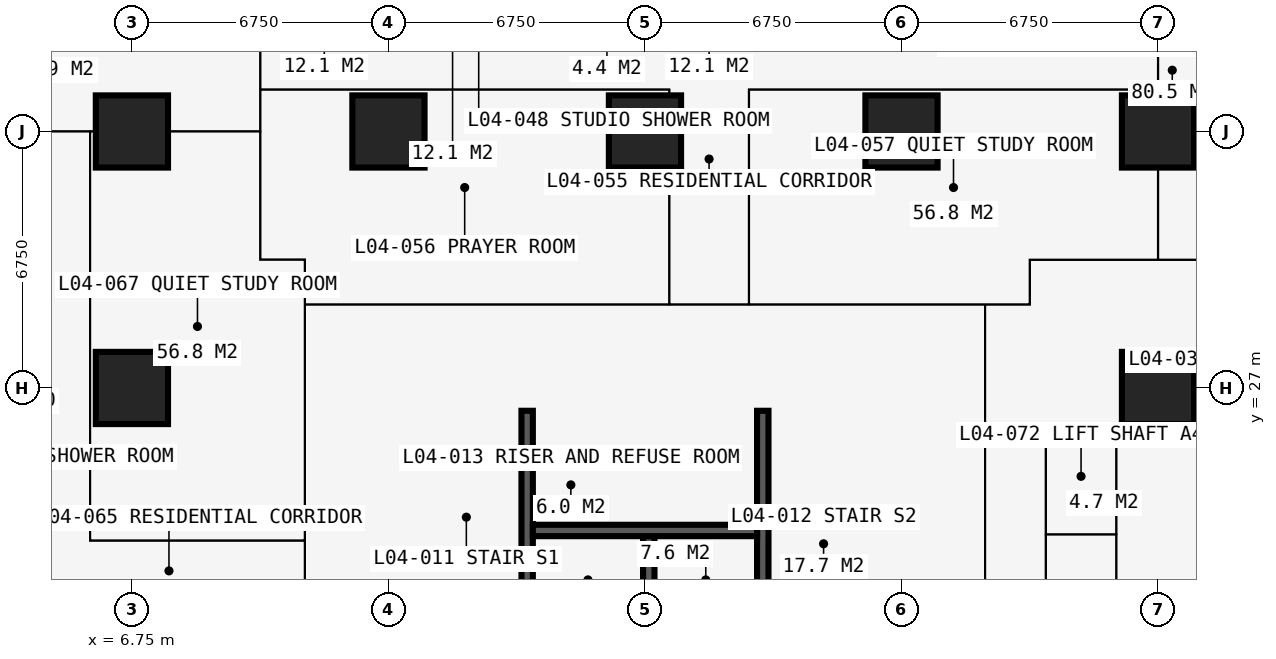
"""IFC4 building model, lengths in metres.
Left out: names, types, materials, properties, quantities, classifications, styles, units other than length and angle.
Written with IfcOpenShell. Run it as: python <this file> out.ifc"""

import sys

from ifc_helpers import new_model, si_unit, direction, frame, frame_2d, origin, origin_2d, place, context, subcontext, project, spatial, rectangle, extrude, element, fill, save


model = new_model("IFC4")
c1 = context("Model", 3, precision=1e-05, world=origin(), true_north=direction((0.0, 1.0)))
c2 = subcontext(c1, "Body", "Model", "MODEL_VIEW")
j1 = project(units=[si_unit("LENGTHUNIT", "METRE"), si_unit("PLANEANGLEUNIT", "RADIAN")], contexts=[c1])
p1 = place(None, origin())
s1 = spatial("IfcSite", under=j1, at=p1, CompositionType="ELEMENT")
p2 = place(p1, origin())
s2 = spatial("IfcBuilding", under=s1, at=p2, CompositionType="ELEMENT")
p3 = place(p2, frame((0.0, 0.0, 18.0)))
s3 = spatial("IfcBuildingStorey", under=s2, at=p3, CompositionType="ELEMENT", Elevation=18.0)
for number, where, z_axis, x_axis in (
    (1, (6.75, 27.0, 0.0), (0.0, 0.0, 1.0), (1.0, 0.0, 0.0)),
    (2, (6.75, 33.75, 0.0), (0.0, 0.0, 1.0), (1.0, 0.0, 0.0)),
    (3, (13.5, 33.75, 0.0), (0.0, 0.0, 1.0), (1.0, 0.0, 0.0)),
    (4, (20.25, 33.75, 0.0), (0.0, 0.0, 1.0), (1.0, 0.0, 0.0)),
    (5, (27.0, 33.75, 0.0), (0.0, 0.0, 1.0), (1.0, 0.0, 0.0)),
    (6, (33.75, 27.0, 0.0), (0.0, 0.0, 1.0), (1.0, 0.0, 0.0)),
    (7, (33.75, 33.75, 0.0), (0.0, 0.0, 1.0), (1.0, 0.0, 0.0)),
):
    element("IfcColumn", number, at=place(p3, frame(where, z_axis=z_axis, x_axis=x_axis)), inside=s3, PredefinedType="COLUMN", context=c2, shape_type="SweptSolid", body=[
        extrude(rectangle(XDim=1.9, YDim=1.9, at=origin_2d()), origin(), (0.0, 0.0, 1.0), 3.6),
    ])
p4 = place(p3, frame((27.0, 14.1, 0.0), z_axis=(0.0, 0.0, 1.0), x_axis=(0.0, 1.0, 0.0)))
e8 = element("IfcWall", 8, at=p4, inside=s3, PredefinedType="SHEAR", context=c2, shape_type="SweptSolid", body=[
    extrude(rectangle(XDim=12.3, YDim=1.2, at=frame_2d((6.15, 0.0))), origin(), (0.0, 0.0, 1.0), 3.6),
])
p5 = place(p4, frame((3.65, 0.0, 0.0)))
e9 = element("IfcOpeningElement", 9, at=p5, cuts=e8, PredefinedType="OPENING", context=c2, shape_type="SweptSolid", body=[
    extrude(rectangle(XDim=1.2, YDim=2.2, at=frame_2d((0.6, 1.1))), frame((0.0, 0.61, 0.0), z_axis=(0.0, -1.0, 0.0), x_axis=(1.0, 0.0, 0.0)), (0.0, 0.0, 1.0), 1.22),
])
p6 = place(p3, frame((27.6, 27.0, 0.0), z_axis=(0.0, 0.0, 1.0), x_axis=(-1.0, 0.0, 0.0)))
e10 = element("IfcWall", 10, at=p6, inside=s3, PredefinedType="SHEAR", context=c2, shape_type="SweptSolid", body=[
    extrude(rectangle(XDim=14.7, YDim=1.2, at=frame_2d((7.35, 0.0))), origin(), (0.0, 0.0, 1.0), 3.6),
])
p7 = place(p6, frame((5.225, 0.0, 0.0)))
e11 = element("IfcOpeningElement", 11, at=p7, cuts=e10, PredefinedType="OPENING", context=c2, shape_type="SweptSolid", body=[
    extrude(rectangle(XDim=0.9, YDim=2.2, at=frame_2d((0.45, 1.1))), frame((0.0, 0.61, 0.0), z_axis=(0.0, -1.0, 0.0), x_axis=(1.0, 0.0, 0.0)), (0.0, 0.0, 1.0), 1.22),
])
p8 = place(p6, frame((8.2, 0.0, 0.0)))
e12 = element("IfcOpeningElement", 12, at=p8, cuts=e10, PredefinedType="OPENING", context=c2, shape_type="SweptSolid", body=[
    extrude(rectangle(XDim=1.0, YDim=2.2, at=frame_2d((0.5, 1.1))), frame((0.0, 0.61, 0.0), z_axis=(0.0, -1.0, 0.0), x_axis=(1.0, 0.0, 0.0)), (0.0, 0.0, 1.0), 1.22),
])
p9 = place(p3, frame((13.5, 26.4, 0.0), z_axis=(0.0, 0.0, 1.0), x_axis=(0.0, -1.0, 0.0)))
e13 = element("IfcWall", 13, at=p9, inside=s3, PredefinedType="SHEAR", context=c2, shape_type="SweptSolid", body=[
    extrude(rectangle(XDim=12.3, YDim=1.2, at=frame_2d((6.15, 0.0))), origin(), (0.0, 0.0, 1.0), 3.6),
])
p10 = place(p9, frame((7.45, 0.0, 0.0)))
e14 = element("IfcOpeningElement", 14, at=p10, cuts=e13, PredefinedType="OPENING", context=c2, shape_type="SweptSolid", body=[
    extrude(rectangle(XDim=1.2, YDim=2.2, at=frame_2d((0.6, 1.1))), frame((0.0, 0.61, 0.0), z_axis=(0.0, -1.0, 0.0), x_axis=(1.0, 0.0, 0.0)), (0.0, 0.0, 1.0), 1.22),
])
for number, where, z_axis, x_axis in (
    (15, (17.15, 20.3, 0.0), (0.0, 0.0, 1.0), (0.0, 1.0, 0.0)),
    (16, (23.35, 20.3, 0.0), (0.0, 0.0, 1.0), (0.0, 1.0, 0.0)),
):
    element("IfcWall", number, at=place(p3, frame(where, z_axis=z_axis, x_axis=x_axis)), inside=s3, PredefinedType="SHEAR", context=c2, shape_type="SweptSolid", body=[
        extrude(rectangle(XDim=6.1, YDim=0.3, at=frame_2d((3.05, 0.0))), origin(), (0.0, 0.0, 1.0), 3.6),
    ])
p11 = place(p3, frame((20.35, 20.3, 0.0), z_axis=(0.0, 0.0, 1.0), x_axis=(0.0, 1.0, 0.0)))
e17 = element("IfcWall", 17, at=p11, inside=s3, PredefinedType="SHEAR", context=c2, shape_type="SweptSolid", body=[
    extrude(rectangle(XDim=2.8, YDim=0.3, at=frame_2d((1.4, 0.0))), origin(), (0.0, 0.0, 1.0), 3.6),
])
p12 = place(p3, frame((17.3, 23.25, 0.0), z_axis=(0.0, 0.0, 1.0), x_axis=(1.0, 0.0, 0.0)))
e18 = element("IfcWall", 18, at=p12, inside=s3, PredefinedType="SHEAR", context=c2, shape_type="SweptSolid", body=[
    extrude(rectangle(XDim=5.9, YDim=0.3, at=frame_2d((2.95, 0.0))), origin(), (0.0, 0.0, 1.0), 3.6),
])
p13 = place(p3, frame((19.375, 23.4, 0.0), z_axis=(0.0, 0.0, 1.0), x_axis=(0.0, 1.0, 0.0)))
e19 = element("IfcWall", 19, at=p13, inside=s3, PredefinedType="PARTITIONING", context=c2, shape_type="SweptSolid", body=[
    extrude(rectangle(XDim=3.0, YDim=0.15, at=frame_2d((1.5, 0.0))), origin(), (0.0, 0.0, 1.0), 3.375),
])
p14 = place(p3, frame((4.15, 33.75, 0.0), z_axis=(0.0, 0.0, 1.0), x_axis=(1.0, 0.0, 0.0)))
e20 = element("IfcWall", 20, at=p14, inside=s3, PredefinedType="PARTITIONING", context=c2, shape_type="SweptSolid", body=[
    extrude(rectangle(XDim=5.975, YDim=0.15, at=frame_2d((2.988, 0.0))), origin(), (0.0, 0.0, 1.0), 2.877),
])
p15 = place(p3, frame((5.65, 22.988, 0.0), z_axis=(0.0, 0.0, 1.0), x_axis=(0.0, 1.0, 0.0)))
e21 = element("IfcWall", 21, at=p15, inside=s3, PredefinedType="PARTITIONING", context=c2, shape_type="SweptSolid", body=[
    extrude(rectangle(XDim=10.762, YDim=0.15, at=frame_2d((5.381, 0.0))), origin(), (0.0, 0.0, 1.0), 3.375),
])
p16 = place(p15, frame((5.0, 0.0, 0.0)))
e22 = element("IfcOpeningElement", 22, at=p16, cuts=e21, PredefinedType="OPENING", context=c2, shape_type="SweptSolid", body=[
    extrude(rectangle(XDim=0.95, YDim=2.2, at=frame_2d((0.475, 1.1))), frame((0.0, 0.085, 0.0), z_axis=(0.0, -1.0, 0.0), x_axis=(1.0, 0.0, 0.0)), (0.0, 0.0, 1.0), 0.17),
])
p17 = place(p3, frame((5.65, 22.988, 0.0), z_axis=(0.0, 0.0, 1.0), x_axis=(1.0, 0.0, 0.0)))
e23 = element("IfcWall", 23, at=p17, inside=s3, PredefinedType="PARTITIONING", context=c2, shape_type="SweptSolid", body=[
    extrude(rectangle(XDim=5.65, YDim=0.15, at=frame_2d((2.825, 0.0))), origin(), (0.0, 0.0, 1.0), 3.375),
])
p18 = place(p3, frame((10.125, 30.375, 0.0), z_axis=(0.0, 0.0, 1.0), x_axis=(0.0, 1.0, 0.0)))
e24 = element("IfcWall", 24, at=p18, inside=s3, PredefinedType="PARTITIONING", context=c2, shape_type="SweptSolid", body=[
    extrude(rectangle(XDim=10.859, YDim=0.15, at=frame_2d((5.429, 0.0))), origin(), (0.0, 0.0, 1.0), 3.375),
])
p19 = place(p18, frame((4.725, 0.0, 0.0)))
e25 = element("IfcOpeningElement", 25, at=p19, cuts=e24, PredefinedType="OPENING", context=c2, shape_type="SweptSolid", body=[
    extrude(rectangle(XDim=1.0, YDim=2.2, at=frame_2d((0.5, 1.1))), frame((0.0, 0.085, 0.0), z_axis=(0.0, -1.0, 0.0), x_axis=(1.0, 0.0, 0.0)), (0.0, 0.0, 1.0), 0.17),
])
p20 = place(p3, frame((10.125, 30.375, 0.0), z_axis=(0.0, 0.0, 1.0), x_axis=(1.0, 0.0, 0.0)))
e26 = element("IfcWall", 26, at=p20, inside=s3, PredefinedType="PARTITIONING", context=c2, shape_type="SweptSolid", body=[
    extrude(rectangle(XDim=1.175, YDim=0.15, at=frame_2d((0.587, 0.0))), origin(), (0.0, 0.0, 1.0), 3.375),
])
p21 = place(p3, frame((10.125, 34.85, 0.0), z_axis=(0.0, 0.0, 1.0), x_axis=(1.0, 0.0, 0.0)))
e27 = element("IfcWall", 27, at=p21, inside=s3, PredefinedType="PARTITIONING", context=c2, shape_type="SweptSolid", body=[
    extrude(rectangle(XDim=10.762, YDim=0.15, at=frame_2d((5.381, 0.0))), origin(), (0.0, 0.0, 1.0), 3.375),
])
p22 = place(p21, frame((4.9, 0.0, 0.0)))
e28 = element("IfcOpeningElement", 28, at=p22, cuts=e27, PredefinedType="OPENING", context=c2, shape_type="SweptSolid", body=[
    extrude(rectangle(XDim=0.95, YDim=2.2, at=frame_2d((0.475, 1.1))), frame((0.0, 0.085, 0.0), z_axis=(0.0, -1.0, 0.0), x_axis=(1.0, 0.0, 0.0)), (0.0, 0.0, 1.0), 0.17),
])
p23 = place(p3, frame((11.3, 11.3, 0.0), z_axis=(0.0, 0.0, 1.0), x_axis=(0.0, 1.0, 0.0)))
e29 = element("IfcWall", 29, at=p23, inside=s3, PredefinedType="PARTITIONING", context=c2, shape_type="SweptSolid", body=[
    extrude(rectangle(XDim=19.075, YDim=0.15, at=frame_2d((9.538, 0.0))), origin(), (0.0, 0.0, 1.0), 3.375),
])
p24 = place(p23, frame((10.137, 0.0, 0.0)))
e30 = element("IfcOpeningElement", 30, at=p24, cuts=e29, PredefinedType="OPENING", context=c2, shape_type="SweptSolid", body=[
    extrude(rectangle(XDim=1.0, YDim=2.2, at=frame_2d((0.5, 1.1))), frame((0.0, 0.085, 0.0), z_axis=(0.0, -1.0, 0.0), x_axis=(1.0, 0.0, 0.0)), (0.0, 0.0, 1.0), 0.17),
])
p25 = place(p3, frame((11.3, 29.2, 0.0), z_axis=(0.0, 0.0, 1.0), x_axis=(1.0, 0.0, 0.0)))
e31 = element("IfcWall", 31, at=p25, inside=s3, PredefinedType="PARTITIONING", context=c2, shape_type="SweptSolid", body=[
    extrude(rectangle(XDim=19.075, YDim=0.15, at=frame_2d((9.538, 0.0))), origin(), (0.0, 0.0, 1.0), 3.375),
])
p26 = place(p25, frame((10.137, 0.0, 0.0)))
e32 = element("IfcOpeningElement", 32, at=p26, cuts=e31, PredefinedType="OPENING", context=c2, shape_type="SweptSolid", body=[
    extrude(rectangle(XDim=1.0, YDim=2.2, at=frame_2d((0.5, 1.1))), frame((0.0, 0.085, 0.0), z_axis=(0.0, -1.0, 0.0), x_axis=(1.0, 0.0, 0.0)), (0.0, 0.0, 1.0), 0.17),
])
p27 = place(p3, frame((20.887, 29.2, 0.0), z_axis=(0.0, 0.0, 1.0), x_axis=(0.0, 1.0, 0.0)))
e33 = element("IfcWall", 33, at=p27, inside=s3, PredefinedType="PARTITIONING", context=c2, shape_type="SweptSolid", body=[
    extrude(rectangle(XDim=5.65, YDim=0.15, at=frame_2d((2.825, 0.0))), origin(), (0.0, 0.0, 1.0), 3.375),
])
p28 = place(p3, frame((22.988, 34.85, 0.0), z_axis=(0.0, 0.0, 1.0), x_axis=(1.0, 0.0, 0.0)))
e34 = element("IfcWall", 34, at=p28, inside=s3, PredefinedType="PARTITIONING", context=c2, shape_type="SweptSolid", body=[
    extrude(rectangle(XDim=10.762, YDim=0.15, at=frame_2d((5.381, 0.0))), origin(), (0.0, 0.0, 1.0), 3.375),
])
p29 = place(p28, frame((5.0, 0.0, 0.0)))
e35 = element("IfcOpeningElement", 35, at=p29, cuts=e34, PredefinedType="OPENING", context=c2, shape_type="SweptSolid", body=[
    extrude(rectangle(XDim=0.95, YDim=2.2, at=frame_2d((0.475, 1.1))), frame((0.0, 0.085, 0.0), z_axis=(0.0, -1.0, 0.0), x_axis=(1.0, 0.0, 0.0)), (0.0, 0.0, 1.0), 0.17),
])
p30 = place(p3, frame((22.988, 29.2, 0.0), z_axis=(0.0, 0.0, 1.0), x_axis=(0.0, 1.0, 0.0)))
e36 = element("IfcWall", 36, at=p30, inside=s3, PredefinedType="PARTITIONING", context=c2, shape_type="SweptSolid", body=[
    extrude(rectangle(XDim=5.65, YDim=0.15, at=frame_2d((2.825, 0.0))), origin(), (0.0, 0.0, 1.0), 3.375),
])
p31 = place(p3, frame((29.2, 11.3, 0.0), z_axis=(0.0, 0.0, 1.0), x_axis=(0.0, 1.0, 0.0)))
e37 = element("IfcWall", 37, at=p31, inside=s3, PredefinedType="PARTITIONING", context=c2, shape_type="SweptSolid", body=[
    extrude(rectangle(XDim=17.9, YDim=0.2, at=frame_2d((8.95, 0.0))), origin(), (0.0, 0.0, 1.0), 3.375),
])
p32 = place(p31, frame((8.35, 0.0, 0.0)))
e38 = element("IfcOpeningElement", 38, at=p32, cuts=e37, PredefinedType="OPENING", context=c2, shape_type="SweptSolid", body=[
    extrude(rectangle(XDim=1.2, YDim=2.2, at=frame_2d((0.6, 1.1))), frame((0.0, 0.11, 0.0), z_axis=(0.0, -1.0, 0.0), x_axis=(1.0, 0.0, 0.0)), (0.0, 0.0, 1.0), 0.22),
])
p33 = place(p3, frame((29.2, 25.7, 0.0), z_axis=(0.0, 0.0, 1.0), x_axis=(1.0, 0.0, 0.0)))
e39 = element("IfcWall", 39, at=p33, inside=s3, PredefinedType="SHEAR", context=c2, shape_type="SweptSolid", body=[
    extrude(rectangle(XDim=3.45, YDim=0.1, at=frame_2d((1.725, 0.0))), origin(), (0.0, 0.0, 1.0), 3.375),
])
p34 = place(p3, frame((30.375, 29.2, 0.0), z_axis=(0.0, 0.0, 1.0), x_axis=(0.0, 1.0, 0.0)))
e40 = element("IfcWall", 40, at=p34, inside=s3, PredefinedType="PARTITIONING", context=c2, shape_type="SweptSolid", body=[
    extrude(rectangle(XDim=1.175, YDim=0.15, at=frame_2d((0.587, 0.0))), origin(), (0.0, 0.0, 1.0), 3.375),
])
p35 = place(p3, frame((30.375, 30.375, 0.0), z_axis=(0.0, 0.0, 1.0), x_axis=(1.0, 0.0, 0.0)))
e41 = element("IfcWall", 41, at=p35, inside=s3, PredefinedType="PARTITIONING", context=c2, shape_type="SweptSolid", body=[
    extrude(rectangle(XDim=10.859, YDim=0.15, at=frame_2d((5.429, 0.0))), origin(), (0.0, 0.0, 1.0), 3.375),
])
p36 = place(p35, frame((4.725, 0.0, 0.0)))
e42 = element("IfcOpeningElement", 42, at=p36, cuts=e41, PredefinedType="OPENING", context=c2, shape_type="SweptSolid", body=[
    extrude(rectangle(XDim=1.0, YDim=2.2, at=frame_2d((0.5, 1.1))), frame((0.0, 0.085, 0.0), z_axis=(0.0, -1.0, 0.0), x_axis=(1.0, 0.0, 0.0)), (0.0, 0.0, 1.0), 0.17),
])
p37 = place(p3, frame((30.8, 14.8, 0.0), z_axis=(0.0, 0.0, 1.0), x_axis=(0.0, 1.0, 0.0)))
e43 = element("IfcWall", 43, at=p37, inside=s3, PredefinedType="PARTITIONING", context=c2, shape_type="SweptSolid", body=[
    extrude(rectangle(XDim=10.9, YDim=0.15, at=frame_2d((5.45, 0.0))), origin(), (0.0, 0.0, 1.0), 3.375),
])
p38 = place(p37, frame((0.75, 0.0, 0.0)))
e44 = element("IfcOpeningElement", 44, at=p38, cuts=e43, PredefinedType="OPENING", context=c2, shape_type="SweptSolid", body=[
    extrude(rectangle(XDim=1.1, YDim=2.2, at=frame_2d((0.55, 1.1))), frame((0.0, 0.085, 0.0), z_axis=(0.0, -1.0, 0.0), x_axis=(1.0, 0.0, 0.0)), (0.0, 0.0, 1.0), 0.17),
])
p39 = place(p37, frame((3.25, 0.0, 0.0)))
e45 = element("IfcOpeningElement", 45, at=p39, cuts=e43, PredefinedType="OPENING", context=c2, shape_type="SweptSolid", body=[
    extrude(rectangle(XDim=1.1, YDim=2.2, at=frame_2d((0.55, 1.1))), frame((0.0, 0.085, 0.0), z_axis=(0.0, -1.0, 0.0), x_axis=(1.0, 0.0, 0.0)), (0.0, 0.0, 1.0), 0.17),
])
p40 = place(p37, frame((6.5, 0.0, 0.0)))
e46 = element("IfcOpeningElement", 46, at=p40, cuts=e43, PredefinedType="OPENING", context=c2, shape_type="SweptSolid", body=[
    extrude(rectangle(XDim=1.1, YDim=2.2, at=frame_2d((0.55, 1.1))), frame((0.0, 0.085, 0.0), z_axis=(0.0, -1.0, 0.0), x_axis=(1.0, 0.0, 0.0)), (0.0, 0.0, 1.0), 0.17),
])
p41 = place(p37, frame((9.05, 0.0, 0.0)))
e47 = element("IfcOpeningElement", 47, at=p41, cuts=e43, PredefinedType="OPENING", context=c2, shape_type="SweptSolid", body=[
    extrude(rectangle(XDim=1.1, YDim=2.2, at=frame_2d((0.55, 1.1))), frame((0.0, 0.085, 0.0), z_axis=(0.0, -1.0, 0.0), x_axis=(1.0, 0.0, 0.0)), (0.0, 0.0, 1.0), 0.17),
])
p42 = place(p3, frame((30.8, 23.15, 0.0), z_axis=(0.0, 0.0, 1.0), x_axis=(1.0, 0.0, 0.0)))
e48 = element("IfcWall", 48, at=p42, inside=s3, PredefinedType="SHEAR", context=c2, shape_type="SweptSolid", body=[
    extrude(rectangle(XDim=1.85, YDim=0.1, at=frame_2d((0.925, 0.0))), origin(), (0.0, 0.0, 1.0), 3.375),
])
p43 = place(p3, frame((32.65, 20.6, 0.0), z_axis=(0.0, 0.0, 1.0), x_axis=(0.0, 1.0, 0.0)))
e49 = element("IfcWall", 49, at=p43, inside=s3, PredefinedType="PARTITIONING", context=c2, shape_type="SweptSolid", body=[
    extrude(rectangle(XDim=5.1, YDim=0.15, at=frame_2d((2.55, 0.0))), origin(), (0.0, 0.0, 1.0), 3.375),
])
p44 = place(p3, frame((33.75, 30.375, 0.0), z_axis=(0.0, 0.0, 1.0), x_axis=(0.0, 1.0, 0.0)))
e50 = element("IfcWall", 50, at=p44, inside=s3, PredefinedType="PARTITIONING", context=c2, shape_type="SweptSolid", body=[
    extrude(rectangle(XDim=5.975, YDim=0.15, at=frame_2d((2.988, 0.0))), origin(), (0.0, 0.0, 1.0), 2.877),
])
p45 = place(p7, origin())
e51 = element("IfcDoor", 51, at=p45, inside=s3, OperationType="SINGLE_SWING_LEFT", PredefinedType="DOOR", context=c2, shape_type="SweptSolid", body=[
    extrude(rectangle(XDim=0.9, YDim=2.2, at=frame_2d((0.45, 1.1))), frame((0.0, 0.4, 0.0), z_axis=(0.0, -1.0, 0.0), x_axis=(1.0, 0.0, 0.0)), (0.0, 0.0, 1.0), 0.8),
])
fill(e11, e51)
p46 = place(p8, origin())
e52 = element("IfcDoor", 52, at=p46, inside=s3, OperationType="SINGLE_SWING_LEFT", PredefinedType="DOOR", context=c2, shape_type="SweptSolid", body=[
    extrude(rectangle(XDim=1.0, YDim=2.2, at=frame_2d((0.5, 1.1))), frame((0.0, 0.025, 0.0), z_axis=(0.0, -1.0, 0.0), x_axis=(1.0, 0.0, 0.0)), (0.0, 0.0, 1.0), 0.05),
])
fill(e12, e52)
p47 = place(p26, origin())
e53 = element("IfcDoor", 53, at=p47, inside=s3, OperationType="SINGLE_SWING_LEFT", PredefinedType="DOOR", context=c2, shape_type="SweptSolid", body=[
    extrude(rectangle(XDim=1.0, YDim=2.2, at=frame_2d((0.5, 1.1))), frame((0.0, 0.025, 0.0), z_axis=(0.0, -1.0, 0.0), x_axis=(1.0, 0.0, 0.0)), (0.0, 0.0, 1.0), 0.05),
])
fill(e32, e53)
p48 = place(p22, origin())
e54 = element("IfcDoor", 54, at=p48, inside=s3, OperationType="SINGLE_SWING_LEFT", PredefinedType="DOOR", context=c2, shape_type="SweptSolid", body=[
    extrude(rectangle(XDim=0.95, YDim=2.2, at=frame_2d((0.475, 1.1))), frame((0.0, 0.025, 0.0), z_axis=(0.0, -1.0, 0.0), x_axis=(1.0, 0.0, 0.0)), (0.0, 0.0, 1.0), 0.05),
])
fill(e28, e54)
p49 = place(p29, origin())
e55 = element("IfcDoor", 55, at=p49, inside=s3, OperationType="SINGLE_SWING_LEFT", PredefinedType="DOOR", context=c2, shape_type="SweptSolid", body=[
    extrude(rectangle(XDim=0.95, YDim=2.2, at=frame_2d((0.475, 1.1))), frame((0.0, 0.025, 0.0), z_axis=(0.0, -1.0, 0.0), x_axis=(1.0, 0.0, 0.0)), (0.0, 0.0, 1.0), 0.05),
])
fill(e35, e55)
p50 = place(p19, origin())
e56 = element("IfcDoor", 56, at=p50, inside=s3, OperationType="SINGLE_SWING_LEFT", PredefinedType="DOOR", context=c2, shape_type="SweptSolid", body=[
    extrude(rectangle(XDim=1.0, YDim=2.2, at=frame_2d((0.5, 1.1))), frame((0.0, 0.025, 0.0), z_axis=(0.0, -1.0, 0.0), x_axis=(1.0, 0.0, 0.0)), (0.0, 0.0, 1.0), 0.05),
])
fill(e25, e56)
p51 = place(p24, origin())
e57 = element("IfcDoor", 57, at=p51, inside=s3, OperationType="SINGLE_SWING_LEFT", PredefinedType="DOOR", context=c2, shape_type="SweptSolid", body=[
    extrude(rectangle(XDim=1.0, YDim=2.2, at=frame_2d((0.5, 1.1))), frame((0.0, 0.025, 0.0), z_axis=(0.0, -1.0, 0.0), x_axis=(1.0, 0.0, 0.0)), (0.0, 0.0, 1.0), 0.05),
])
fill(e30, e57)
p52 = place(p16, origin())
e58 = element("IfcDoor", 58, at=p52, inside=s3, OperationType="SINGLE_SWING_LEFT", PredefinedType="DOOR", context=c2, shape_type="SweptSolid", body=[
    extrude(rectangle(XDim=0.95, YDim=2.2, at=frame_2d((0.475, 1.1))), frame((0.0, 0.025, 0.0), z_axis=(0.0, -1.0, 0.0), x_axis=(1.0, 0.0, 0.0)), (0.0, 0.0, 1.0), 0.05),
])
fill(e22, e58)
p53 = place(p40, origin())
e59 = element("IfcDoor", 59, at=p53, inside=s3, OperationType="DOUBLE_DOOR_SLIDING", PredefinedType="DOOR", context=c2, shape_type="SweptSolid", body=[
    extrude(rectangle(XDim=1.1, YDim=2.2, at=frame_2d((0.55, 1.1))), frame((0.0, 0.025, 0.0), z_axis=(0.0, -1.0, 0.0), x_axis=(1.0, 0.0, 0.0)), (0.0, 0.0, 1.0), 0.05),
])
fill(e46, e59)
p54 = place(p41, origin())
e60 = element("IfcDoor", 60, at=p54, inside=s3, OperationType="DOUBLE_DOOR_SLIDING", PredefinedType="DOOR", context=c2, shape_type="SweptSolid", body=[
    extrude(rectangle(XDim=1.1, YDim=2.2, at=frame_2d((0.55, 1.1))), frame((0.0, 0.025, 0.0), z_axis=(0.0, -1.0, 0.0), x_axis=(1.0, 0.0, 0.0)), (0.0, 0.0, 1.0), 0.05),
])
fill(e47, e60)
save(model, sys.argv[1])
